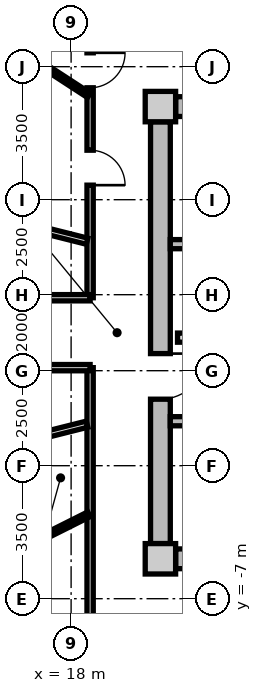
"""IFC4 building model, lengths in metres.
Left out: names, types, materials, properties, quantities, classifications, styles, units other than length and angle.
Written with IfcOpenShell. Run it as: python <this file> out.ifc"""

import sys

from ifc_helpers import new_model, si_unit, direction, frame, frame_2d, origin, origin_2d, place, context, subcontext, project, spatial, rectangle, extrude, source, transform, mapped, element, fill, save


model = new_model("IFC4")
c1 = context("Model", 3, precision=1e-05, world=origin(), true_north=direction((0.0, 1.0)))
c2 = subcontext(c1, "Body", "Model", "MODEL_VIEW")
j1 = project(units=[si_unit("LENGTHUNIT", "METRE"), si_unit("PLANEANGLEUNIT", "RADIAN")], contexts=[c1])
p1 = place(None, origin())
s1 = spatial("IfcSite", under=j1, at=p1, CompositionType="ELEMENT")
p2 = place(p1, origin())
s2 = spatial("IfcBuilding", under=s1, at=p2, CompositionType="ELEMENT")
p3 = place(p2, frame((0.0, 0.0, 210.85)))
s3 = spatial("IfcBuildingStorey", under=s2, at=p3, CompositionType="ELEMENT", Elevation=210.85)
m1 = source(origin(), c2, "Body", "SweptSolid", [
    extrude(rectangle(XDim=0.8, YDim=0.8, at=origin_2d()), origin(), (0.0, 0.0, 1.0), 3.05),
])
for number, where, z_axis, x_axis in (
    (1, (20.35, -5.95, 0.0), (0.0, 0.0, 1.0), (1.0, 0.0, 0.0)),
    (2, (20.35, 5.95, 0.0), (0.0, 0.0, 1.0), (1.0, 0.0, 0.0)),
):
    element("IfcColumn", number, at=place(p3, frame(where, z_axis=z_axis, x_axis=x_axis)), inside=s3, PredefinedType="COLUMN", context=c2, shape_type="MappedRepresentation", body=[
        mapped(m1, transform((0.0, 0.0, 0.0), x_axis=(1.0, 0.0, 0.0), y_axis=(0.0, 1.0, 0.0), z_axis=(0.0, 0.0, 1.0), scale=1.0)),
    ])
m2 = source(origin(), c2, "Body", "SweptSolid", [
    extrude(rectangle(XDim=14.5, YDim=0.52, at=frame_2d((7.25, 0.0))), origin(), (0.0, 0.0, 1.0), 2.76),
])
for number, where, z_axis, x_axis in (
    (3, (20.75, 5.95, 0.0), (0.0, 0.0, 1.0), (1.0, 0.0, 0.0)),
    (4, (35.25, -5.95, 0.0), (0.0, 0.0, 1.0), (-1.0, 0.0, 0.0)),
):
    element("IfcWall", number, at=place(p3, frame(where, z_axis=z_axis, x_axis=x_axis)), inside=s3, PredefinedType="SHEAR", context=c2, shape_type="MappedRepresentation", body=[
        mapped(m2, transform((0.0, 0.0, 0.0), x_axis=(1.0, 0.0, 0.0), y_axis=(0.0, 1.0, 0.0), z_axis=(0.0, 0.0, 1.0), scale=1.0)),
    ])
m3 = source(origin(), c2, "Body", "SweptSolid", [
    extrude(rectangle(XDim=11.1, YDim=0.52, at=frame_2d((5.55, 0.0))), origin(), (0.0, 0.0, 1.0), 2.76),
])
p4 = place(p3, frame((20.35, -5.55, 0.0), z_axis=(0.0, 0.0, 1.0), x_axis=(0.0, 1.0, 0.0)))
e5 = element("IfcWall", 5, at=p4, inside=s3, PredefinedType="SHEAR", context=c2, shape_type="MappedRepresentation", body=[
    mapped(m3, transform((0.0, 0.0, 0.0), x_axis=(1.0, 0.0, 0.0), y_axis=(0.0, 1.0, 0.0), z_axis=(0.0, 0.0, 1.0), scale=1.0)),
])
p5 = place(p4, frame((3.8, 0.0, 0.0)))
e6 = element("IfcOpeningElement", 6, at=p5, cuts=e5, PredefinedType="OPENING", context=c2, shape_type="SweptSolid", body=[
    extrude(rectangle(XDim=1.2, YDim=2.15, at=frame_2d((0.6, 1.075))), frame((0.0, 0.27, 0.0), z_axis=(0.0, -1.0, 0.0), x_axis=(1.0, 0.0, 0.0)), (0.0, 0.0, 1.0), 0.54),
])
m4 = source(origin(), c2, "Body", "SweptSolid", [
    extrude(rectangle(XDim=7.93, YDim=0.24, at=frame_2d((3.965, 0.0))), origin(), (0.0, 0.0, 1.0), 2.76),
])
p6 = place(p3, frame((20.61, 2.33, 0.0), z_axis=(0.0, 0.0, 1.0), x_axis=(1.0, 0.0, 0.0)))
e7 = element("IfcWall", 7, at=p6, inside=s3, PredefinedType="PARTITIONING", context=c2, shape_type="MappedRepresentation", body=[
    mapped(m4, transform((0.0, 0.0, 0.0), x_axis=(1.0, 0.0, 0.0), y_axis=(0.0, 1.0, 0.0), z_axis=(0.0, 0.0, 1.0), scale=1.0)),
])
p7 = place(p3, frame((20.61, -2.33, 0.0), z_axis=(0.0, 0.0, 1.0), x_axis=(1.0, 0.0, 0.0)))
e8 = element("IfcWall", 8, at=p7, inside=s3, PredefinedType="PARTITIONING", context=c2, shape_type="MappedRepresentation", body=[
    mapped(m4, transform((0.0, 0.0, 0.0), x_axis=(1.0, 0.0, 0.0), y_axis=(0.0, 1.0, 0.0), z_axis=(0.0, 0.0, 1.0), scale=1.0)),
])
p8 = place(p7, frame((1.05, 0.0, 0.0)))
e9 = element("IfcOpeningElement", 9, at=p8, cuts=e8, PredefinedType="OPENING", context=c2, shape_type="SweptSolid", body=[
    extrude(rectangle(XDim=1.1, YDim=2.15, at=frame_2d((0.55, 1.075))), frame((0.0, 0.13, 0.0), z_axis=(0.0, -1.0, 0.0), x_axis=(1.0, 0.0, 0.0)), (0.0, 0.0, 1.0), 0.26),
])
m5 = source(origin(), c2, "Body", "SweptSolid", [
    extrude(rectangle(XDim=7.62, YDim=0.24, at=frame_2d((3.81, 0.0))), origin(), (0.0, 0.0, 1.0), 2.745),
])
p9 = place(p3, frame((20.8, -0.13, 0.0), z_axis=(0.0, 0.0, 1.0), x_axis=(1.0, 0.0, 0.0)))
e10 = element("IfcWall", 10, at=p9, inside=s3, PredefinedType="PARTITIONING", context=c2, shape_type="MappedRepresentation", body=[
    mapped(m5, transform((0.0, 0.0, 0.0), x_axis=(1.0, 0.0, 0.0), y_axis=(0.0, 1.0, 0.0), z_axis=(0.0, 0.0, 1.0), scale=1.0)),
])
p10 = place(p9, frame((6.22, 0.0, 0.0)))
e11 = element("IfcOpeningElement", 11, at=p10, cuts=e10, PredefinedType="OPENING", context=c2, shape_type="SweptSolid", body=[
    extrude(rectangle(XDim=1.0, YDim=2.1, at=frame_2d((0.5, 1.05))), frame((0.0, 0.13, 0.0), z_axis=(0.0, -1.0, 0.0), x_axis=(1.0, 0.0, 0.0)), (0.0, 0.0, 1.0), 0.26),
])
p11 = place(p9, frame((2.4, 0.0, 0.0)))
e12 = element("IfcOpeningElement", 12, at=p11, cuts=e10, PredefinedType="OPENING", context=c2, shape_type="SweptSolid", body=[
    extrude(rectangle(XDim=1.0, YDim=2.1, at=frame_2d((0.5, 1.05))), frame((0.0, 0.13, 0.0), z_axis=(0.0, -1.0, 0.0), x_axis=(1.0, 0.0, 0.0)), (0.0, 0.0, 1.0), 0.26),
])
m6 = source(origin(), c2, "Body", "SweptSolid", [
    extrude(rectangle(XDim=6.88, YDim=0.165, at=frame_2d((3.44, 0.0))), origin(), (0.0, 0.0, 1.0), 2.745),
])
p12 = place(p3, frame((18.5, -7.8, 0.0), z_axis=(0.0, 0.0, 1.0), x_axis=(0.0, 1.0, 0.0)))
e13 = element("IfcWall", 13, at=p12, inside=s3, PredefinedType="PARTITIONING", context=c2, shape_type="MappedRepresentation", body=[
    mapped(m6, transform((0.0, 0.0, 0.0), x_axis=(1.0, 0.0, 0.0), y_axis=(0.0, 1.0, 0.0), z_axis=(0.0, 0.0, 1.0), scale=1.0)),
])
p13 = place(p3, frame((18.5, 0.92, 0.0), z_axis=(0.0, 0.0, 1.0), x_axis=(0.0, 1.0, 0.0)))
e14 = element("IfcWall", 14, at=p13, inside=s3, PredefinedType="PARTITIONING", context=c2, shape_type="MappedRepresentation", body=[
    mapped(m6, transform((0.0, 0.0, 0.0), x_axis=(1.0, 0.0, 0.0), y_axis=(0.0, 1.0, 0.0), z_axis=(0.0, 0.0, 1.0), scale=1.0)),
])
p14 = place(p13, frame((5.525, 0.0, 0.0)))
e15 = element("IfcOpeningElement", 15, at=p14, cuts=e14, PredefinedType="OPENING", context=c2, shape_type="SweptSolid", body=[
    extrude(rectangle(XDim=0.92, YDim=2.1, at=frame_2d((0.46, 1.05))), frame((0.0, 0.093, 0.0), z_axis=(0.0, -1.0, 0.0), x_axis=(1.0, 0.0, 0.0)), (0.0, 0.0, 1.0), 0.185),
])
p15 = place(p13, frame((2.962, 0.0, 0.0)))
e16 = element("IfcOpeningElement", 16, at=p15, cuts=e14, PredefinedType="OPENING", context=c2, shape_type="SweptSolid", body=[
    extrude(rectangle(XDim=0.92, YDim=2.1, at=frame_2d((0.46, 1.05))), frame((0.0, 0.093, 0.0), z_axis=(0.0, -1.0, 0.0), x_axis=(1.0, 0.0, 0.0)), (0.0, 0.0, 1.0), 0.185),
])
m7 = source(origin(), c2, "Body", "SweptSolid", [
    extrude(rectangle(XDim=6.157, YDim=0.165, at=frame_2d((3.079, 0.0))), origin(), (0.0, 0.0, 1.0), 2.345),
])
for number, where, z_axis, x_axis in (
    (17, (18.42, 2.407, 0.0), (0.0, 0.0, 1.0), (-0.97, 0.244, 0.0)),
    (18, (18.42, -2.407, 0.0), (0.0, 0.0, 1.0), (-0.97, -0.244, 0.0)),
):
    element("IfcWall", number, at=place(p3, frame(where, z_axis=z_axis, x_axis=x_axis)), inside=s3, PredefinedType="PARTITIONING", context=c2, shape_type="MappedRepresentation", body=[
        mapped(m7, transform((0.0, 0.0, 0.0), x_axis=(1.0, 0.0, 0.0), y_axis=(0.0, 1.0, 0.0), z_axis=(0.0, 0.0, 1.0), scale=1.0)),
    ])
m8 = source(origin(), c2, "Body", "SweptSolid", [
    extrude(rectangle(XDim=3.904, YDim=0.14, at=frame_2d((1.952, 0.0))), origin(), (0.0, 0.0, 1.0), 2.745),
])
p16 = place(p3, frame((18.47, 6.246, 0.0), z_axis=(0.0, 0.0, 1.0), x_axis=(-0.838024687996, 0.545632314209, 0.0)))
e19 = element("IfcWall", 19, at=p16, inside=s3, PredefinedType="PARTITIONING", context=c2, shape_type="MappedRepresentation", body=[
    mapped(m8, transform((0.0, 0.0, 0.0), x_axis=(1.0, 0.0, 0.0), y_axis=(0.0, 1.0, 0.0), z_axis=(0.0, 0.0, 1.0), scale=1.0)),
])
m9 = source(origin(), c2, "Body", "SweptSolid", [
    extrude(rectangle(XDim=1.638, YDim=0.14, at=frame_2d((0.819, 0.0))), origin(), (0.0, 0.0, 1.0), 2.745),
])
p17 = place(p3, frame((18.47, -4.778, 0.0), z_axis=(0.0, 0.0, 1.0), x_axis=(-0.893919977945, -0.448226586707, 0.0)))
e20 = element("IfcWall", 20, at=p17, inside=s3, PredefinedType="PARTITIONING", context=c2, shape_type="MappedRepresentation", body=[
    mapped(m9, transform((0.0, 0.0, 0.0), x_axis=(1.0, 0.0, 0.0), y_axis=(0.0, 1.0, 0.0), z_axis=(0.0, 0.0, 1.0), scale=1.0)),
])
m10 = source(origin(), c2, "Body", "SweptSolid", [
    extrude(rectangle(XDim=3.472, YDim=0.115, at=frame_2d((1.736, 0.0))), origin(), (0.0, 0.0, 1.0), 2.745),
])
p18 = place(p3, frame((16.396, -6.317, 0.0), z_axis=(0.0, 0.0, 1.0), x_axis=(0.485804139346, -0.874067696574, 0.0)))
e21 = element("IfcWall", 21, at=p18, inside=s3, PredefinedType="PARTITIONING", context=c2, shape_type="MappedRepresentation", body=[
    mapped(m10, transform((0.0, 0.0, 0.0), x_axis=(1.0, 0.0, 0.0), y_axis=(0.0, 1.0, 0.0), z_axis=(0.0, 0.0, 1.0), scale=1.0)),
])
p19 = place(p18, frame((1.261, 0.0, 0.0)))
e22 = element("IfcOpeningElement", 22, at=p19, cuts=e21, PredefinedType="OPENING", context=c2, shape_type="SweptSolid", body=[
    extrude(rectangle(XDim=0.95, YDim=2.1, at=frame_2d((0.475, 1.05))), frame((0.0, 0.067, 0.0), z_axis=(0.0, -1.0, 0.0), x_axis=(1.0, 0.0, 0.0)), (0.0, 0.0, 1.0), 0.135),
])
m11 = source(origin(), c2, "Body", "SweptSolid", [
    extrude(rectangle(XDim=37.0, YDim=0.165, at=frame_2d((18.5, 0.0))), origin(), (0.0, 0.0, 1.0), 2.745),
])
p20 = place(p3, frame((-18.5, -0.92, 0.0), z_axis=(0.0, 0.0, 1.0), x_axis=(1.0, 0.0, 0.0)))
e23 = element("IfcWall", 23, at=p20, inside=s3, PredefinedType="PARTITIONING", context=c2, shape_type="MappedRepresentation", body=[
    mapped(m11, transform((0.0, 0.0, 0.0), x_axis=(1.0, 0.0, 0.0), y_axis=(0.0, 1.0, 0.0), z_axis=(0.0, 0.0, 1.0), scale=1.0)),
])
p21 = place(p20, frame((2.662, 0.0, 0.0)))
e24 = element("IfcOpeningElement", 24, at=p21, cuts=e23, PredefinedType="OPENING", context=c2, shape_type="SweptSolid", body=[
    extrude(rectangle(XDim=0.95, YDim=2.1, at=frame_2d((0.475, 1.05))), frame((0.0, 0.093, 0.0), z_axis=(0.0, -1.0, 0.0), x_axis=(1.0, 0.0, 0.0)), (0.0, 0.0, 1.0), 0.185),
])
p22 = place(p20, frame((33.388, 0.0, 0.0)))
e25 = element("IfcOpeningElement", 25, at=p22, cuts=e23, PredefinedType="OPENING", context=c2, shape_type="SweptSolid", body=[
    extrude(rectangle(XDim=0.95, YDim=2.1, at=frame_2d((0.475, 1.05))), frame((0.0, 0.093, 0.0), z_axis=(0.0, -1.0, 0.0), x_axis=(1.0, 0.0, 0.0)), (0.0, 0.0, 1.0), 0.185),
])
p23 = place(p20, frame((9.075, 0.0, 0.0)))
e26 = element("IfcOpeningElement", 26, at=p23, cuts=e23, PredefinedType="OPENING", context=c2, shape_type="SweptSolid", body=[
    extrude(rectangle(XDim=1.25, YDim=2.2, at=frame_2d((0.625, 1.1))), frame((0.0, 0.093, 0.0), z_axis=(0.0, -1.0, 0.0), x_axis=(1.0, 0.0, 0.0)), (0.0, 0.0, 1.0), 0.185),
])
p24 = place(p20, frame((14.875, 0.0, 0.0)))
e27 = element("IfcOpeningElement", 27, at=p24, cuts=e23, PredefinedType="OPENING", context=c2, shape_type="SweptSolid", body=[
    extrude(rectangle(XDim=1.25, YDim=2.2, at=frame_2d((0.625, 1.1))), frame((0.0, 0.093, 0.0), z_axis=(0.0, -1.0, 0.0), x_axis=(1.0, 0.0, 0.0)), (0.0, 0.0, 1.0), 0.185),
])
p25 = place(p20, frame((20.875, 0.0, 0.0)))
e28 = element("IfcOpeningElement", 28, at=p25, cuts=e23, PredefinedType="OPENING", context=c2, shape_type="SweptSolid", body=[
    extrude(rectangle(XDim=1.25, YDim=2.2, at=frame_2d((0.625, 1.1))), frame((0.0, 0.093, 0.0), z_axis=(0.0, -1.0, 0.0), x_axis=(1.0, 0.0, 0.0)), (0.0, 0.0, 1.0), 0.185),
])
p26 = place(p20, frame((26.675, 0.0, 0.0)))
e29 = element("IfcOpeningElement", 29, at=p26, cuts=e23, PredefinedType="OPENING", context=c2, shape_type="SweptSolid", body=[
    extrude(rectangle(XDim=1.25, YDim=2.2, at=frame_2d((0.625, 1.1))), frame((0.0, 0.093, 0.0), z_axis=(0.0, -1.0, 0.0), x_axis=(1.0, 0.0, 0.0)), (0.0, 0.0, 1.0), 0.185),
])
p27 = place(p3, frame((-18.5, 0.92, 0.0), z_axis=(0.0, 0.0, 1.0), x_axis=(1.0, 0.0, 0.0)))
e30 = element("IfcWall", 30, at=p27, inside=s3, PredefinedType="PARTITIONING", context=c2, shape_type="MappedRepresentation", body=[
    mapped(m11, transform((0.0, 0.0, 0.0), x_axis=(1.0, 0.0, 0.0), y_axis=(0.0, 1.0, 0.0), z_axis=(0.0, 0.0, 1.0), scale=1.0)),
])
p28 = place(p27, frame((2.662, 0.0, 0.0)))
e31 = element("IfcOpeningElement", 31, at=p28, cuts=e30, PredefinedType="OPENING", context=c2, shape_type="SweptSolid", body=[
    extrude(rectangle(XDim=0.95, YDim=2.1, at=frame_2d((0.475, 1.05))), frame((0.0, 0.093, 0.0), z_axis=(0.0, -1.0, 0.0), x_axis=(1.0, 0.0, 0.0)), (0.0, 0.0, 1.0), 0.185),
])
p29 = place(p27, frame((33.388, 0.0, 0.0)))
e32 = element("IfcOpeningElement", 32, at=p29, cuts=e30, PredefinedType="OPENING", context=c2, shape_type="SweptSolid", body=[
    extrude(rectangle(XDim=0.95, YDim=2.1, at=frame_2d((0.475, 1.05))), frame((0.0, 0.093, 0.0), z_axis=(0.0, -1.0, 0.0), x_axis=(1.0, 0.0, 0.0)), (0.0, 0.0, 1.0), 0.185),
])
p30 = place(p27, frame((7.64, 0.0, 0.0)))
e33 = element("IfcOpeningElement", 33, at=p30, cuts=e30, PredefinedType="OPENING", context=c2, shape_type="SweptSolid", body=[
    extrude(rectangle(XDim=0.92, YDim=2.1, at=frame_2d((0.46, 1.05))), frame((0.0, 0.093, 0.0), z_axis=(0.0, -1.0, 0.0), x_axis=(1.0, 0.0, 0.0)), (0.0, 0.0, 1.0), 0.185),
])
p31 = place(p27, frame((10.275, 0.0, 0.0)))
e34 = element("IfcOpeningElement", 34, at=p31, cuts=e30, PredefinedType="OPENING", context=c2, shape_type="SweptSolid", body=[
    extrude(rectangle(XDim=1.25, YDim=2.2, at=frame_2d((0.625, 1.1))), frame((0.0, 0.093, 0.0), z_axis=(0.0, -1.0, 0.0), x_axis=(1.0, 0.0, 0.0)), (0.0, 0.0, 1.0), 0.185),
])
p32 = place(p27, frame((14.875, 0.0, 0.0)))
e35 = element("IfcOpeningElement", 35, at=p32, cuts=e30, PredefinedType="OPENING", context=c2, shape_type="SweptSolid", body=[
    extrude(rectangle(XDim=1.25, YDim=2.2, at=frame_2d((0.625, 1.1))), frame((0.0, 0.093, 0.0), z_axis=(0.0, -1.0, 0.0), x_axis=(1.0, 0.0, 0.0)), (0.0, 0.0, 1.0), 0.185),
])
p33 = place(p27, frame((20.875, 0.0, 0.0)))
e36 = element("IfcOpeningElement", 36, at=p33, cuts=e30, PredefinedType="OPENING", context=c2, shape_type="SweptSolid", body=[
    extrude(rectangle(XDim=1.25, YDim=2.2, at=frame_2d((0.625, 1.1))), frame((0.0, 0.093, 0.0), z_axis=(0.0, -1.0, 0.0), x_axis=(1.0, 0.0, 0.0)), (0.0, 0.0, 1.0), 0.185),
])
p34 = place(p27, frame((26.675, 0.0, 0.0)))
e37 = element("IfcOpeningElement", 37, at=p34, cuts=e30, PredefinedType="OPENING", context=c2, shape_type="SweptSolid", body=[
    extrude(rectangle(XDim=1.25, YDim=2.2, at=frame_2d((0.625, 1.1))), frame((0.0, 0.093, 0.0), z_axis=(0.0, -1.0, 0.0), x_axis=(1.0, 0.0, 0.0)), (0.0, 0.0, 1.0), 0.185),
])
m12 = source(origin(), c2, "Body", "SweptSolid", [
    extrude(rectangle(XDim=1.2, YDim=2.15, at=frame_2d((0.6, 1.075))), frame((0.0, 0.025, 0.0), z_axis=(0.0, -1.0, 0.0), x_axis=(1.0, 0.0, 0.0)), (0.0, 0.0, 1.0), 0.05),
])
p35 = place(p5, frame((1.2, 0.0, 0.0), z_axis=(0.0, 0.0, 1.0), x_axis=(-1.0, 0.0, 0.0)))
e38 = element("IfcDoor", 38, at=p35, inside=s3, OperationType="SINGLE_SWING_LEFT", PredefinedType="DOOR", context=c2, shape_type="MappedRepresentation", body=[
    mapped(m12, transform((0.0, 0.0, 0.0), x_axis=(1.0, 0.0, 0.0), y_axis=(0.0, 1.0, 0.0), z_axis=(0.0, 0.0, 1.0), scale=1.0)),
])
fill(e6, e38)
m13 = source(origin(), c2, "Body", "SweptSolid", [
    extrude(rectangle(XDim=0.92, YDim=2.1, at=frame_2d((0.46, 1.05))), frame((0.0, 0.025, 0.0), z_axis=(0.0, -1.0, 0.0), x_axis=(1.0, 0.0, 0.0)), (0.0, 0.0, 1.0), 0.05),
])
p36 = place(p14, frame((0.92, 0.0, 0.0), z_axis=(0.0, 0.0, 1.0), x_axis=(-1.0, 0.0, 0.0)))
e39 = element("IfcDoor", 39, at=p36, inside=s3, OperationType="SINGLE_SWING_LEFT", PredefinedType="DOOR", context=c2, shape_type="MappedRepresentation", body=[
    mapped(m13, transform((0.0, 0.0, 0.0), x_axis=(1.0, 0.0, 0.0), y_axis=(0.0, 1.0, 0.0), z_axis=(0.0, 0.0, 1.0), scale=1.0)),
])
fill(e15, e39)
p37 = place(p15, frame((0.92, 0.0, 0.0), z_axis=(0.0, 0.0, 1.0), x_axis=(-1.0, 0.0, 0.0)))
e40 = element("IfcDoor", 40, at=p37, inside=s3, OperationType="SINGLE_SWING_RIGHT", PredefinedType="DOOR", context=c2, shape_type="MappedRepresentation", body=[
    mapped(m13, transform((0.0, 0.0, 0.0), x_axis=(1.0, 0.0, 0.0), y_axis=(0.0, 1.0, 0.0), z_axis=(0.0, 0.0, 1.0), scale=1.0)),
])
fill(e16, e40)
save(model, sys.argv[1])
